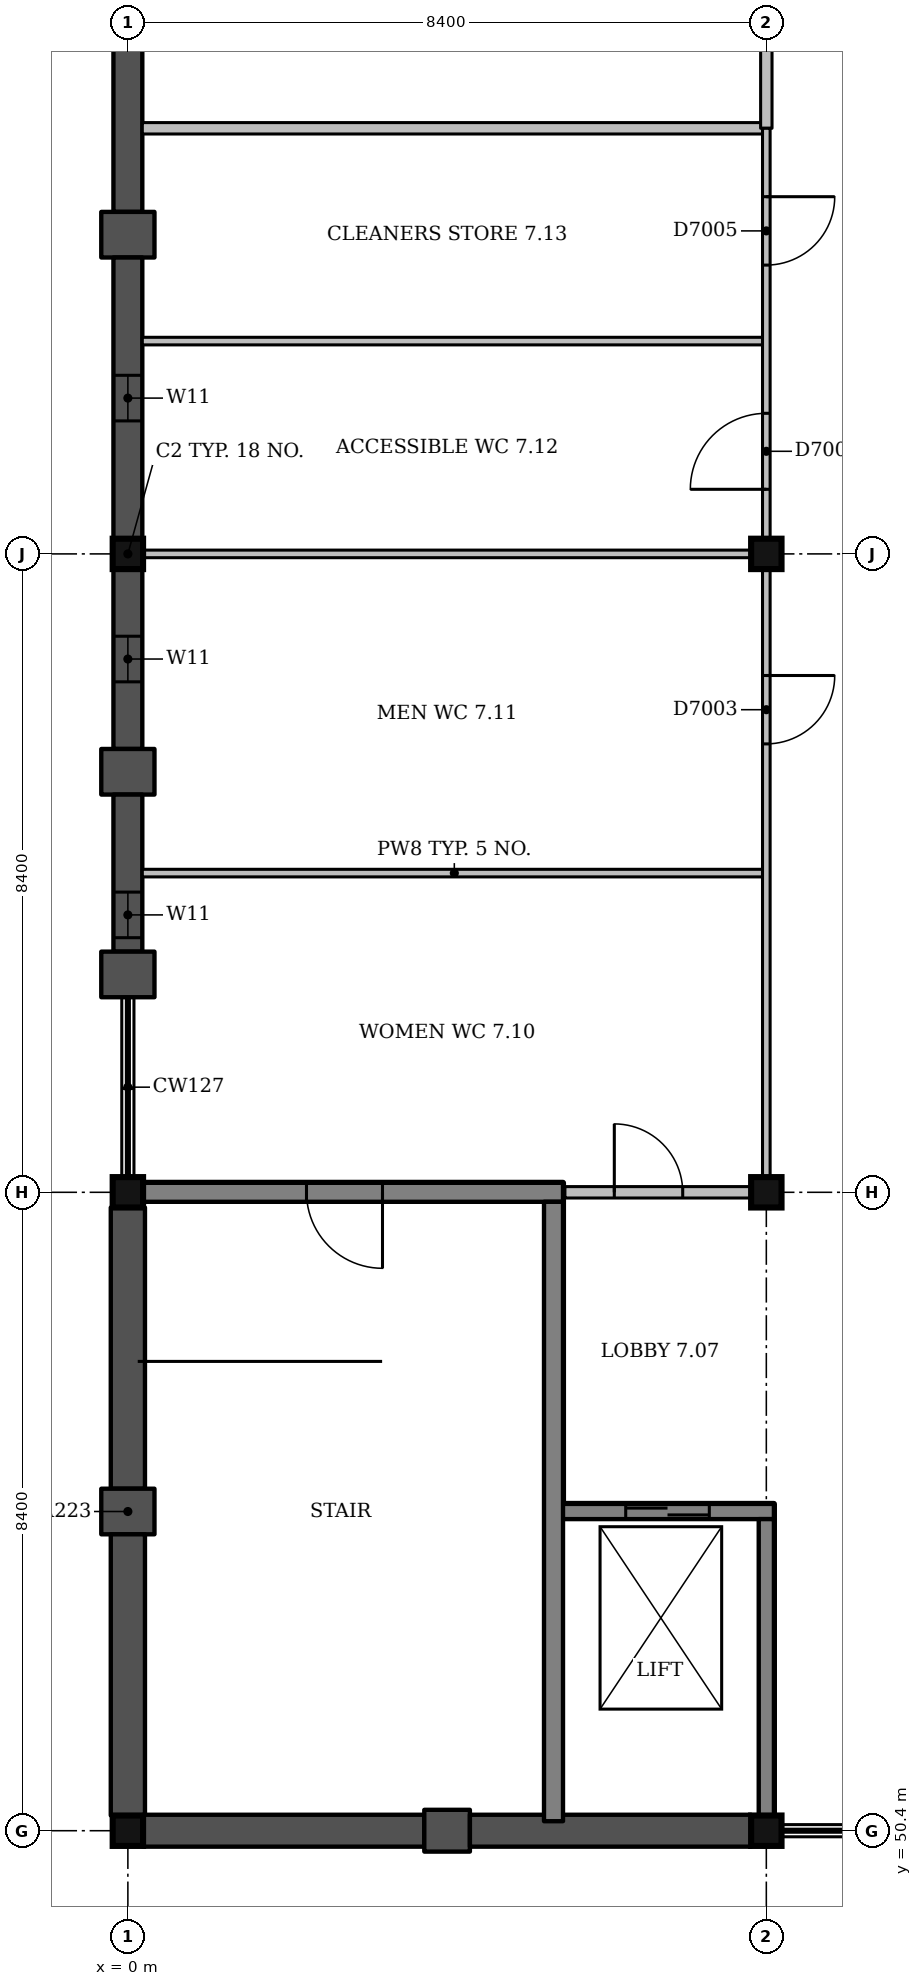
"""IFC4 building model, lengths in metres.
Left out: names, types, materials, properties, quantities, classifications, styles, units other than length and angle.
Written with IfcOpenShell. Run it as: python <this file> out.ifc"""

import sys

from ifc_helpers import new_model, si_unit, direction, frame, frame_2d, origin, origin_2d, place, context, subcontext, project, spatial, rectangle, extrude, element, fill, save


model = new_model("IFC4")
c1 = context("Model", 3, precision=1e-05, world=origin(), true_north=direction((0.0, 1.0)))
c2 = subcontext(c1, "Body", "Model", "MODEL_VIEW")
j1 = project(units=[si_unit("LENGTHUNIT", "METRE"), si_unit("PLANEANGLEUNIT", "RADIAN")], contexts=[c1])
p1 = place(None, origin())
s1 = spatial("IfcSite", under=j1, at=p1, CompositionType="ELEMENT")
p2 = place(p1, origin())
s2 = spatial("IfcBuilding", under=s1, at=p2, CompositionType="ELEMENT")
p3 = place(p2, frame((0.0, 0.0, 31.5)))
s3 = spatial("IfcBuildingStorey", under=s2, at=p3, CompositionType="ELEMENT", Elevation=31.5)
for number, where, z_axis, x_axis in (
    (1, (0.0, 50.4, 0.0), (0.0, 0.0, 1.0), (1.0, 0.0, 0.0)),
    (2, (0.0, 58.8, 0.0), (0.0, 0.0, 1.0), (1.0, 0.0, 0.0)),
    (3, (0.0, 67.2, 0.0), (0.0, 0.0, 1.0), (1.0, 0.0, 0.0)),
    (4, (8.4, 50.4, 0.0), (0.0, 0.0, 1.0), (1.0, 0.0, 0.0)),
    (5, (8.4, 58.8, 0.0), (0.0, 0.0, 1.0), (1.0, 0.0, 0.0)),
    (6, (8.4, 67.2, 0.0), (0.0, 0.0, 1.0), (1.0, 0.0, 0.0)),
):
    element("IfcColumn", number, at=place(p3, frame(where, z_axis=z_axis, x_axis=x_axis)), inside=s3, PredefinedType="COLUMN", context=c2, shape_type="SweptSolid", body=[
        extrude(rectangle(XDim=0.4, YDim=0.4, at=origin_2d()), origin(), (0.0, 0.0, 1.0), 4.5),
    ])
p4 = place(p3, frame((5.5, 54.6, 0.0), z_axis=(0.0, 0.0, 1.0), x_axis=(1.0, 0.0, 0.0)))
e7 = element("IfcWall", 7, at=p4, inside=s3, PredefinedType="SHEAR", context=c2, shape_type="SweptSolid", body=[
    extrude(rectangle(XDim=3.0, YDim=0.2, at=frame_2d((1.5, 0.0))), origin(), (0.0, 0.0, 1.0), 4.5),
])
p5 = place(p4, frame((1.05, 0.0, 0.0)))
e8 = element("IfcOpeningElement", 8, at=p5, cuts=e7, PredefinedType="OPENING", context=c2, shape_type="SweptSolid", body=[
    extrude(rectangle(XDim=1.1, YDim=2.1, at=frame_2d((0.55, 1.05))), frame((0.0, 0.11, 0.0), z_axis=(0.0, -1.0, 0.0), x_axis=(1.0, 0.0, 0.0)), (0.0, 0.0, 1.0), 0.22),
])
p6 = place(p3, frame((8.4, 50.6, 0.0), z_axis=(0.0, 0.0, 1.0), x_axis=(0.0, 1.0, 0.0)))
e9 = element("IfcWall", 9, at=p6, inside=s3, PredefinedType="SHEAR", context=c2, shape_type="SweptSolid", body=[
    extrude(rectangle(XDim=3.9, YDim=0.2, at=frame_2d((1.95, 0.0))), origin(), (0.0, 0.0, 1.0), 4.5),
])
p7 = place(p3, frame((0.2, 58.8, 0.0), z_axis=(0.0, 0.0, 1.0), x_axis=(1.0, 0.0, 0.0)))
e10 = element("IfcWall", 10, at=p7, inside=s3, PredefinedType="SHEAR", context=c2, shape_type="SweptSolid", body=[
    extrude(rectangle(XDim=5.525, YDim=0.25, at=frame_2d((2.763, 0.0))), origin(), (0.0, 0.0, 1.0), 4.2),
])
p8 = place(p7, frame((2.15, 0.0, 0.0)))
e11 = element("IfcOpeningElement", 11, at=p8, cuts=e10, PredefinedType="OPENING", context=c2, shape_type="SweptSolid", body=[
    extrude(rectangle(XDim=1.0, YDim=2.1, at=frame_2d((0.5, 1.05))), frame((0.0, 0.135, 0.0), z_axis=(0.0, -1.0, 0.0), x_axis=(1.0, 0.0, 0.0)), (0.0, 0.0, 1.0), 0.27),
])
p9 = place(p3, frame((5.6, 50.525, 0.0), z_axis=(0.0, 0.0, 1.0), x_axis=(0.0, 1.0, 0.0)))
e12 = element("IfcWall", 12, at=p9, inside=s3, PredefinedType="SHEAR", context=c2, shape_type="SweptSolid", body=[
    extrude(rectangle(XDim=8.15, YDim=0.25, at=frame_2d((4.075, 0.0))), origin(), (0.0, 0.0, 1.0), 4.2),
])
p10 = place(p3, frame((0.0, 75.4, 0.0), z_axis=(0.0, 0.0, 1.0), x_axis=(0.0, -1.0, 0.0)))
e13 = element("IfcWall", 13, at=p10, inside=s3, PredefinedType="SOLIDWALL", context=c2, shape_type="SweptSolid", body=[
    extrude(rectangle(XDim=3.7, YDim=0.38, at=frame_2d((1.85, 0.0))), origin(), (0.0, 0.0, 1.0), 3.6),
])
p11 = place(p3, frame((0.0, 71.7, 0.0), z_axis=(0.0, 0.0, 1.0), x_axis=(0.0, -1.0, 0.0)))
e14 = element("IfcWall", 14, at=p11, inside=s3, PredefinedType="SOLIDWALL", context=c2, shape_type="SweptSolid", body=[
    extrude(rectangle(XDim=0.6, YDim=0.7, at=frame_2d((0.3, 0.0))), origin(), (0.0, 0.0, 1.0), 3.6),
])
p12 = place(p3, frame((0.0, 71.1, 0.0), z_axis=(0.0, 0.0, 1.0), x_axis=(0.0, -1.0, 0.0)))
e15 = element("IfcWall", 15, at=p12, inside=s3, PredefinedType="SOLIDWALL", context=c2, shape_type="SweptSolid", body=[
    extrude(rectangle(XDim=3.7, YDim=0.38, at=frame_2d((1.85, 0.0))), origin(), (0.0, 0.0, 1.0), 3.6),
])
p13 = place(p12, frame((1.55, 0.0, 1.5)))
e16 = element("IfcOpeningElement", 16, at=p13, cuts=e15, PredefinedType="OPENING", context=c2, shape_type="SweptSolid", body=[
    extrude(rectangle(XDim=0.6, YDim=1.2, at=frame_2d((0.3, 0.6))), frame((0.0, 0.2, 0.0), z_axis=(0.0, -1.0, 0.0), x_axis=(1.0, 0.0, 0.0)), (0.0, 0.0, 1.0), 0.4),
])
p14 = place(p3, frame((0.0, 67.0, 0.0), z_axis=(0.0, 0.0, 1.0), x_axis=(0.0, -1.0, 0.0)))
e17 = element("IfcWall", 17, at=p14, inside=s3, PredefinedType="SOLIDWALL", context=c2, shape_type="SweptSolid", body=[
    extrude(rectangle(XDim=2.367, YDim=0.38, at=frame_2d((1.183, 0.0))), origin(), (0.0, 0.0, 1.0), 3.6),
])
p15 = place(p14, frame((0.883, 0.0, 1.5)))
e18 = element("IfcOpeningElement", 18, at=p15, cuts=e17, PredefinedType="OPENING", context=c2, shape_type="SweptSolid", body=[
    extrude(rectangle(XDim=0.6, YDim=1.2, at=frame_2d((0.3, 0.6))), frame((0.0, 0.2, 0.0), z_axis=(0.0, -1.0, 0.0), x_axis=(1.0, 0.0, 0.0)), (0.0, 0.0, 1.0), 0.4),
])
p16 = place(p3, frame((0.0, 64.633, 0.0), z_axis=(0.0, 0.0, 1.0), x_axis=(0.0, -1.0, 0.0)))
e19 = element("IfcWall", 19, at=p16, inside=s3, PredefinedType="SOLIDWALL", context=c2, shape_type="SweptSolid", body=[
    extrude(rectangle(XDim=0.6, YDim=0.7, at=frame_2d((0.3, 0.0))), origin(), (0.0, 0.0, 1.0), 3.6),
])
p17 = place(p3, frame((0.0, 64.033, 0.0), z_axis=(0.0, 0.0, 1.0), x_axis=(0.0, -1.0, 0.0)))
e20 = element("IfcWall", 20, at=p17, inside=s3, PredefinedType="SOLIDWALL", context=c2, shape_type="SweptSolid", body=[
    extrude(rectangle(XDim=2.066, YDim=0.38, at=frame_2d((1.033, 0.0))), origin(), (0.0, 0.0, 1.0), 3.6),
])
p18 = place(p17, frame((1.283, 0.0, 1.5)))
e21 = element("IfcOpeningElement", 21, at=p18, cuts=e20, PredefinedType="OPENING", context=c2, shape_type="SweptSolid", body=[
    extrude(rectangle(XDim=0.6, YDim=1.2, at=frame_2d((0.3, 0.6))), frame((0.0, 0.2, 0.0), z_axis=(0.0, -1.0, 0.0), x_axis=(1.0, 0.0, 0.0)), (0.0, 0.0, 1.0), 0.4),
])
p19 = place(p3, frame((0.0, 61.967, 0.0), z_axis=(0.0, 0.0, 1.0), x_axis=(0.0, -1.0, 0.0)))
e22 = element("IfcWall", 22, at=p19, inside=s3, PredefinedType="SOLIDWALL", context=c2, shape_type="SweptSolid", body=[
    extrude(rectangle(XDim=0.6, YDim=0.7, at=frame_2d((0.3, 0.0))), origin(), (0.0, 0.0, 1.0), 3.6),
])
p20 = place(p3, frame((0.0, 58.6, 0.0), z_axis=(0.0, 0.0, 1.0), x_axis=(0.0, -1.0, 0.0)))
e23 = element("IfcWall", 23, at=p20, inside=s3, PredefinedType="SOLIDWALL", context=c2, shape_type="SweptSolid", body=[
    extrude(rectangle(XDim=3.7, YDim=0.45, at=frame_2d((1.85, 0.0))), origin(), (0.0, 0.0, 1.0), 4.2),
])
p21 = place(p3, frame((0.0, 54.9, 0.0), z_axis=(0.0, 0.0, 1.0), x_axis=(0.0, -1.0, 0.0)))
e24 = element("IfcWall", 24, at=p21, inside=s3, PredefinedType="SOLIDWALL", context=c2, shape_type="SweptSolid", body=[
    extrude(rectangle(XDim=0.6, YDim=0.7, at=frame_2d((0.3, 0.0))), origin(), (0.0, 0.0, 1.0), 4.2),
])
p22 = place(p3, frame((0.0, 54.3, 0.0), z_axis=(0.0, 0.0, 1.0), x_axis=(0.0, -1.0, 0.0)))
e25 = element("IfcWall", 25, at=p22, inside=s3, PredefinedType="SOLIDWALL", context=c2, shape_type="SweptSolid", body=[
    extrude(rectangle(XDim=3.7, YDim=0.45, at=frame_2d((1.85, 0.0))), origin(), (0.0, 0.0, 1.0), 4.2),
])
p23 = place(p3, frame((0.2, 50.4, 0.0), z_axis=(0.0, 0.0, 1.0), x_axis=(1.0, 0.0, 0.0)))
e26 = element("IfcWall", 26, at=p23, inside=s3, PredefinedType="SOLIDWALL", context=c2, shape_type="SweptSolid", body=[
    extrude(rectangle(XDim=3.7, YDim=0.42, at=frame_2d((1.85, 0.0))), origin(), (0.0, 0.0, 1.0), 4.2),
])
p24 = place(p3, frame((3.9, 50.4, 0.0), z_axis=(0.0, 0.0, 1.0), x_axis=(1.0, 0.0, 0.0)))
e27 = element("IfcWall", 27, at=p24, inside=s3, PredefinedType="SOLIDWALL", context=c2, shape_type="SweptSolid", body=[
    extrude(rectangle(XDim=0.6, YDim=0.55, at=frame_2d((0.3, 0.0))), origin(), (0.0, 0.0, 1.0), 4.2),
])
p25 = place(p3, frame((4.5, 50.4, 0.0), z_axis=(0.0, 0.0, 1.0), x_axis=(1.0, 0.0, 0.0)))
e28 = element("IfcWall", 28, at=p25, inside=s3, PredefinedType="SOLIDWALL", context=c2, shape_type="SweptSolid", body=[
    extrude(rectangle(XDim=3.7, YDim=0.42, at=frame_2d((1.85, 0.0))), origin(), (0.0, 0.0, 1.0), 4.2),
])
p26 = place(p3, frame((5.75, 58.8, 0.0), z_axis=(0.0, 0.0, 1.0), x_axis=(1.0, 0.0, 0.0)))
e29 = element("IfcWall", 29, at=p26, inside=s3, PredefinedType="PARTITIONING", context=c2, shape_type="SweptSolid", body=[
    extrude(rectangle(XDim=2.45, YDim=0.15, at=frame_2d((1.225, 0.0))), origin(), (0.0, 0.0, 1.0), 3.6),
])
p27 = place(p26, frame((0.65, 0.0, 0.0)))
e30 = element("IfcOpeningElement", 30, at=p27, cuts=e29, PredefinedType="OPENING", context=c2, shape_type="SweptSolid", body=[
    extrude(rectangle(XDim=0.9, YDim=2.1, at=frame_2d((0.45, 1.05))), frame((0.0, 0.085, 0.0), z_axis=(0.0, -1.0, 0.0), x_axis=(1.0, 0.0, 0.0)), (0.0, 0.0, 1.0), 0.17),
])
p28 = place(p3, frame((0.19, 63.0, 0.0), z_axis=(0.0, 0.0, 1.0), x_axis=(1.0, 0.0, 0.0)))
e31 = element("IfcWall", 31, at=p28, inside=s3, PredefinedType="PARTITIONING", context=c2, shape_type="SweptSolid", body=[
    extrude(rectangle(XDim=8.21, YDim=0.1, at=frame_2d((4.105, 0.0))), origin(), (0.0, 0.0, 1.0), 3.6),
])
p29 = place(p3, frame((0.2, 67.2, 0.0), z_axis=(0.0, 0.0, 1.0), x_axis=(1.0, 0.0, 0.0)))
e32 = element("IfcWall", 32, at=p29, inside=s3, PredefinedType="PARTITIONING", context=c2, shape_type="SweptSolid", body=[
    extrude(rectangle(XDim=8.0, YDim=0.1, at=frame_2d((4.0, 0.0))), origin(), (0.0, 0.0, 1.0), 3.6),
])
p30 = place(p3, frame((0.19, 70.0, 0.0), z_axis=(0.0, 0.0, 1.0), x_axis=(1.0, 0.0, 0.0)))
e33 = element("IfcWall", 33, at=p30, inside=s3, PredefinedType="PARTITIONING", context=c2, shape_type="SweptSolid", body=[
    extrude(rectangle(XDim=8.21, YDim=0.1, at=frame_2d((4.105, 0.0))), origin(), (0.0, 0.0, 1.0), 3.6),
])
p31 = place(p3, frame((0.19, 72.8, 0.0), z_axis=(0.0, 0.0, 1.0), x_axis=(1.0, 0.0, 0.0)))
e34 = element("IfcWall", 34, at=p31, inside=s3, PredefinedType="PARTITIONING", context=c2, shape_type="SweptSolid", body=[
    extrude(rectangle(XDim=8.21, YDim=0.15, at=frame_2d((4.105, 0.0))), origin(), (0.0, 0.0, 1.0), 3.6),
])
p32 = place(p3, frame((8.4, 72.8, 0.0), z_axis=(0.0, 0.0, 1.0), x_axis=(0.0, 1.0, 0.0)))
e35 = element("IfcWall", 35, at=p32, inside=s3, PredefinedType="PARTITIONING", context=c2, shape_type="SweptSolid", body=[
    extrude(rectangle(XDim=2.6, YDim=0.15, at=frame_2d((1.3, 0.0))), origin(), (0.0, 0.0, 1.0), 3.6),
])
p33 = place(p3, frame((8.4, 59.0, 0.0), z_axis=(0.0, 0.0, 1.0), x_axis=(0.0, 1.0, 0.0)))
e36 = element("IfcWall", 36, at=p33, inside=s3, PredefinedType="PARTITIONING", context=c2, shape_type="SweptSolid", body=[
    extrude(rectangle(XDim=8.0, YDim=0.1, at=frame_2d((4.0, 0.0))), origin(), (0.0, 0.0, 1.0), 3.6),
])
p34 = place(p33, frame((5.7, 0.0, 0.0)))
e37 = element("IfcOpeningElement", 37, at=p34, cuts=e36, PredefinedType="OPENING", context=c2, shape_type="SweptSolid", body=[
    extrude(rectangle(XDim=0.9, YDim=2.1, at=frame_2d((0.45, 1.05))), frame((0.0, 0.06, 0.0), z_axis=(0.0, -1.0, 0.0), x_axis=(1.0, 0.0, 0.0)), (0.0, 0.0, 1.0), 0.12),
])
p35 = place(p3, frame((8.4, 67.4, 0.0), z_axis=(0.0, 0.0, 1.0), x_axis=(0.0, 1.0, 0.0)))
e38 = element("IfcWall", 38, at=p35, inside=s3, PredefinedType="PARTITIONING", context=c2, shape_type="SweptSolid", body=[
    extrude(rectangle(XDim=5.4, YDim=0.1, at=frame_2d((2.7, 0.0))), origin(), (0.0, 0.0, 1.0), 3.6),
])
p36 = place(p35, frame((0.65, 0.0, 0.0)))
e39 = element("IfcOpeningElement", 39, at=p36, cuts=e38, PredefinedType="OPENING", context=c2, shape_type="SweptSolid", body=[
    extrude(rectangle(XDim=1.0, YDim=2.1, at=frame_2d((0.5, 1.05))), frame((0.0, 0.06, 0.0), z_axis=(0.0, -1.0, 0.0), x_axis=(1.0, 0.0, 0.0)), (0.0, 0.0, 1.0), 0.12),
])
p37 = place(p35, frame((3.6, 0.0, 0.0)))
e40 = element("IfcOpeningElement", 40, at=p37, cuts=e38, PredefinedType="OPENING", context=c2, shape_type="SweptSolid", body=[
    extrude(rectangle(XDim=0.9, YDim=2.1, at=frame_2d((0.45, 1.05))), frame((0.0, 0.06, 0.0), z_axis=(0.0, -1.0, 0.0), x_axis=(1.0, 0.0, 0.0)), (0.0, 0.0, 1.0), 0.12),
])
p38 = place(p13, origin())
e41 = element("IfcWindow", 41, at=p38, inside=s3, PartitioningType="SINGLE_PANEL", PredefinedType="WINDOW", context=c2, shape_type="SweptSolid", body=[
    extrude(rectangle(XDim=0.6, YDim=1.2, at=frame_2d((0.3, 0.6))), frame((0.0, 0.15, 0.0), z_axis=(0.0, -1.0, 0.0), x_axis=(1.0, 0.0, 0.0)), (0.0, 0.0, 1.0), 0.06),
])
fill(e16, e41)
p39 = place(p15, origin())
e42 = element("IfcWindow", 42, at=p39, inside=s3, PartitioningType="SINGLE_PANEL", PredefinedType="WINDOW", context=c2, shape_type="SweptSolid", body=[
    extrude(rectangle(XDim=0.6, YDim=1.2, at=frame_2d((0.3, 0.6))), frame((0.0, 0.15, 0.0), z_axis=(0.0, -1.0, 0.0), x_axis=(1.0, 0.0, 0.0)), (0.0, 0.0, 1.0), 0.06),
])
fill(e18, e42)
p40 = place(p18, origin())
e43 = element("IfcWindow", 43, at=p40, inside=s3, PartitioningType="SINGLE_PANEL", PredefinedType="WINDOW", context=c2, shape_type="SweptSolid", body=[
    extrude(rectangle(XDim=0.6, YDim=1.2, at=frame_2d((0.3, 0.6))), frame((0.0, 0.15, 0.0), z_axis=(0.0, -1.0, 0.0), x_axis=(1.0, 0.0, 0.0)), (0.0, 0.0, 1.0), 0.06),
])
fill(e21, e43)
p41 = place(p27, origin())
e44 = element("IfcDoor", 44, at=p41, inside=s3, OperationType="SINGLE_SWING_LEFT", PredefinedType="DOOR", context=c2, shape_type="SweptSolid", body=[
    extrude(rectangle(XDim=0.9, YDim=2.1, at=frame_2d((0.45, 1.05))), frame((0.0, 0.025, 0.0), z_axis=(0.0, -1.0, 0.0), x_axis=(1.0, 0.0, 0.0)), (0.0, 0.0, 1.0), 0.05),
])
fill(e30, e44)
p42 = place(p34, origin())
e45 = element("IfcDoor", 45, at=p42, inside=s3, OperationType="SINGLE_SWING_RIGHT", PredefinedType="DOOR", context=c2, shape_type="SweptSolid", body=[
    extrude(rectangle(XDim=0.9, YDim=2.1, at=frame_2d((0.45, 1.05))), frame((0.0, 0.025, 0.0), z_axis=(0.0, -1.0, 0.0), x_axis=(1.0, 0.0, 0.0)), (0.0, 0.0, 1.0), 0.05),
])
fill(e37, e45)
p43 = place(p36, origin())
e46 = element("IfcDoor", 46, at=p43, inside=s3, OperationType="SINGLE_SWING_LEFT", PredefinedType="DOOR", context=c2, shape_type="SweptSolid", body=[
    extrude(rectangle(XDim=1.0, YDim=2.1, at=frame_2d((0.5, 1.05))), frame((0.0, 0.025, 0.0), z_axis=(0.0, -1.0, 0.0), x_axis=(1.0, 0.0, 0.0)), (0.0, 0.0, 1.0), 0.05),
])
fill(e39, e46)
p44 = place(p37, origin())
e47 = element("IfcDoor", 47, at=p44, inside=s3, OperationType="SINGLE_SWING_RIGHT", PredefinedType="DOOR", context=c2, shape_type="SweptSolid", body=[
    extrude(rectangle(XDim=0.9, YDim=2.1, at=frame_2d((0.45, 1.05))), frame((0.0, 0.025, 0.0), z_axis=(0.0, -1.0, 0.0), x_axis=(1.0, 0.0, 0.0)), (0.0, 0.0, 1.0), 0.05),
])
fill(e40, e47)
p45 = place(p8, origin())
e48 = element("IfcDoor", 48, at=p45, inside=s3, OperationType="SINGLE_SWING_RIGHT", PredefinedType="DOOR", context=c2, shape_type="SweptSolid", body=[
    extrude(rectangle(XDim=1.0, YDim=2.1, at=frame_2d((0.5, 1.05))), frame((0.0, 0.025, 0.0), z_axis=(0.0, -1.0, 0.0), x_axis=(1.0, 0.0, 0.0)), (0.0, 0.0, 1.0), 0.05),
])
fill(e11, e48)
p46 = place(p5, origin())
e49 = element("IfcDoor", 49, at=p46, inside=s3, OperationType="SLIDING_TO_RIGHT", PredefinedType="DOOR", context=c2, shape_type="SweptSolid", body=[
    extrude(rectangle(XDim=1.1, YDim=2.1, at=frame_2d((0.55, 1.05))), frame((0.0, 0.025, 0.0), z_axis=(0.0, -1.0, 0.0), x_axis=(1.0, 0.0, 0.0)), (0.0, 0.0, 1.0), 0.05),
])
fill(e8, e49)
p47 = place(p2, frame((0.0, 0.0, 36.0)))
p48 = place(p47, frame((0.0, 0.0, 1.3)))
p49 = place(p48, frame((7.0, 52.5, 0.0)))
p50 = place(p49, frame((0.0, 0.0, 0.15)))
e50 = element("IfcWindow", 50, at=p50, inside=s3, PartitioningType="SINGLE_PANEL", PredefinedType="SKYLIGHT", context=c2, shape_type="SweptSolid", body=[
    extrude(rectangle(XDim=0.9, YDim=1.2, at=origin_2d()), origin(), (0.0, 0.0, 1.0), 0.05),
])
save(model, sys.argv[1])
